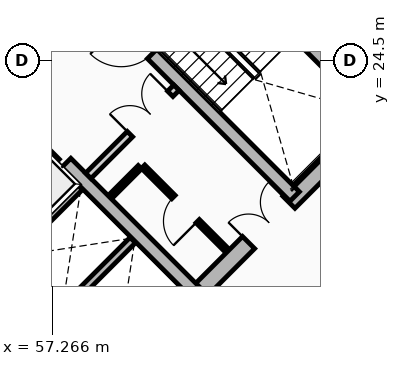
"""IFC4 building model, lengths in metres.
Left out: names, types, materials, properties, quantities, classifications, styles, units other than length and angle.
Written with IfcOpenShell. Run it as: python <this file> out.ifc"""

import sys

from ifc_helpers import new_model, si_unit, direction, frame, frame_2d, origin, place, context, subcontext, project, spatial, rectangle, extrude, source, transform, mapped, element, fill, save


model = new_model("IFC4")
c1 = context("Model", 3, precision=1e-05, world=origin(), true_north=direction((0.0, 1.0)))
c2 = subcontext(c1, "Body", "Model", "MODEL_VIEW")
j1 = project(units=[si_unit("LENGTHUNIT", "METRE"), si_unit("PLANEANGLEUNIT", "RADIAN")], contexts=[c1])
p1 = place(None, origin())
s1 = spatial("IfcSite", under=j1, at=p1, CompositionType="ELEMENT")
p2 = place(p1, origin())
s2 = spatial("IfcBuilding", under=s1, at=p2, CompositionType="ELEMENT")
p3 = place(p2, frame((0.0, 0.0, 102.16)))
s3 = spatial("IfcBuildingStorey", under=s2, at=p3, CompositionType="ELEMENT", Elevation=102.16)
for number, where, z_axis, x_axis in (
    (1, (58.737, 15.697, 0.0), (0.0, 0.0, 1.0), (-0.707, 0.707, 0.0)),
    (2, (66.303, 23.263, 0.0), (0.0, 0.0, 1.0), (-0.707, 0.707, 0.0)),
):
    element("IfcWall", number, at=place(p3, frame(where, z_axis=z_axis, x_axis=x_axis)), inside=s3, PredefinedType="SHEAR", context=c2, shape_type="SweptSolid", body=[
        extrude(rectangle(XDim=14.2, YDim=0.45, at=frame_2d((7.1, 0.0))), origin(), (0.0, 0.0, 1.0), 2.91),
    ])
p4 = place(p3, frame((58.578, 15.856, 0.0), z_axis=(0.0, 0.0, 1.0), x_axis=(0.707106781187, 0.707106781187, 0.0)))
e3 = element("IfcWall", 3, at=p4, inside=s3, PredefinedType="SHEAR", context=c2, shape_type="SweptSolid", body=[
    extrude(rectangle(XDim=10.7, YDim=0.45, at=frame_2d((5.35, 0.0))), origin(), (0.0, 0.0, 1.0), 2.91),
])
m1 = source(origin(), c2, "Body", "SweptSolid", [
    extrude(rectangle(XDim=1.5, YDim=2.02, at=frame_2d((0.75, 1.01))), frame((0.0, 0.235, 0.0), z_axis=(0.0, -1.0, 0.0), x_axis=(1.0, 0.0, 0.0)), (0.0, 0.0, 1.0), 0.47),
])
p5 = place(p4, frame((5.45, 0.0, 0.0)))
e4 = element("IfcOpeningElement", 4, at=p5, cuts=e3, PredefinedType="OPENING", context=c2, shape_type="MappedRepresentation", body=[
    mapped(m1, transform((0.0, 0.0, 0.0), x_axis=(1.0, 0.0, 0.0), y_axis=(0.0, 1.0, 0.0), z_axis=(0.0, 0.0, 1.0), scale=1.0)),
])
p6 = place(p3, frame((61.078, 18.355, 0.0), z_axis=(0.0, 0.0, 1.0), x_axis=(-0.707106781187, 0.707106781187, 0.0)))
e5 = element("IfcWall", 5, at=p6, inside=s3, PredefinedType="SHEAR", context=c2, shape_type="SweptSolid", body=[
    extrude(rectangle(XDim=13.75, YDim=0.35, at=frame_2d((6.875, 0.0))), origin(), (0.0, 0.0, 1.0), 2.91),
])
m2 = source(origin(), c2, "Body", "SweptSolid", [
    extrude(rectangle(XDim=1.1, YDim=2.015, at=frame_2d((0.55, 1.007))), frame((0.0, 0.185, 0.0), z_axis=(0.0, -1.0, 0.0), x_axis=(1.0, 0.0, 0.0)), (0.0, 0.0, 1.0), 0.37),
])
p7 = place(p6, frame((4.875, 0.0, 0.0)))
e6 = element("IfcOpeningElement", 6, at=p7, cuts=e5, PredefinedType="OPENING", context=c2, shape_type="MappedRepresentation", body=[
    mapped(m2, transform((0.0, 0.0, 0.0), x_axis=(1.0, 0.0, 0.0), y_axis=(0.0, 1.0, 0.0), z_axis=(0.0, 0.0, 1.0), scale=1.0)),
])
m3 = source(origin(), c2, "Body", "SweptSolid", [
    extrude(rectangle(XDim=1.15, YDim=2.02, at=frame_2d((0.575, 1.01))), frame((0.0, 0.185, 0.0), z_axis=(0.0, -1.0, 0.0), x_axis=(1.0, 0.0, 0.0)), (0.0, 0.0, 1.0), 0.37),
])
p8 = place(p6, frame((7.295, 0.0, 0.0)))
e7 = element("IfcOpeningElement", 7, at=p8, cuts=e5, PredefinedType="OPENING", context=c2, shape_type="MappedRepresentation", body=[
    mapped(m3, transform((0.0, 0.0, 0.0), x_axis=(1.0, 0.0, 0.0), y_axis=(0.0, 1.0, 0.0), z_axis=(0.0, 0.0, 1.0), scale=1.0)),
])
p9 = place(p3, frame((63.645, 20.922, 0.0), z_axis=(0.0, 0.0, 1.0), x_axis=(-0.707106781187, 0.707106781187, 0.0)))
e8 = element("IfcWall", 8, at=p9, inside=s3, PredefinedType="SHEAR", context=c2, shape_type="SweptSolid", body=[
    extrude(rectangle(XDim=13.75, YDim=0.35, at=frame_2d((6.875, 0.0))), origin(), (0.0, 0.0, 1.0), 2.91),
])
p10 = place(p9, frame((10.0, 0.0, 0.0)))
e9 = element("IfcOpeningElement", 9, at=p10, cuts=e8, PredefinedType="OPENING", context=c2, shape_type="MappedRepresentation", body=[
    mapped(m2, transform((0.0, 0.0, 0.0), x_axis=(1.0, 0.0, 0.0), y_axis=(0.0, 1.0, 0.0), z_axis=(0.0, 0.0, 1.0), scale=1.0)),
])
p11 = place(p9, frame((12.0, 0.0, 0.0)))
e10 = element("IfcOpeningElement", 10, at=p11, cuts=e8, PredefinedType="OPENING", context=c2, shape_type="MappedRepresentation", body=[
    mapped(m2, transform((0.0, 0.0, 0.0), x_axis=(1.0, 0.0, 0.0), y_axis=(0.0, 1.0, 0.0), z_axis=(0.0, 0.0, 1.0), scale=1.0)),
])
p12 = place(p9, frame((5.305, 0.0, 0.0)))
e11 = element("IfcOpeningElement", 11, at=p12, cuts=e8, PredefinedType="OPENING", context=c2, shape_type="MappedRepresentation", body=[
    mapped(m3, transform((0.0, 0.0, 0.0), x_axis=(1.0, 0.0, 0.0), y_axis=(0.0, 1.0, 0.0), z_axis=(0.0, 0.0, 1.0), scale=1.0)),
])
p13 = place(p3, frame((65.83, 23.107, 0.0), z_axis=(0.0, 0.0, 1.0), x_axis=(-0.707088616009, 0.707124945897, 0.0)))
e12 = element("IfcWall", 12, at=p13, inside=s3, PredefinedType="SHEAR", context=c2, shape_type="SweptSolid", body=[
    extrude(rectangle(XDim=6.72, YDim=0.35, at=frame_2d((3.36, 0.0))), origin(), (0.0, 0.0, 1.0), 2.91),
])
p14 = place(p3, frame((55.888, 19.069, 0.0), z_axis=(0.0, 0.0, 1.0), x_axis=(0.707106781187, 0.707106781187, 0.0)))
e13 = element("IfcWall", 13, at=p14, inside=s3, PredefinedType="SHEAR", context=c2, shape_type="SweptSolid", body=[
    extrude(rectangle(XDim=2.97, YDim=0.2, at=frame_2d((1.485, 0.0))), origin(), (0.0, 0.0, 1.0), 2.91),
])
p15 = place(p3, frame((57.284, 17.673, 0.0), z_axis=(0.0, 0.0, 1.0), x_axis=(0.707147878904, 0.70706568108, 0.0)))
e14 = element("IfcWall", 14, at=p15, inside=s3, PredefinedType="SHEAR", context=c2, shape_type="SweptSolid", body=[
    extrude(rectangle(XDim=2.97, YDim=0.2, at=frame_2d((1.485, 0.0))), origin(), (0.0, 0.0, 1.0), 2.91),
])
p16 = place(p3, frame((57.412, 17.97, 0.0), z_axis=(0.0, 0.0, 1.0), x_axis=(-0.707106781187, 0.707106781187, 0.0)))
e15 = element("IfcWall", 15, at=p16, inside=s3, PredefinedType="SHEAR", context=c2, shape_type="SweptSolid", body=[
    extrude(rectangle(XDim=1.735, YDim=0.2, at=frame_2d((0.867, 0.0))), origin(), (0.0, 0.0, 1.0), 2.91),
])
p17 = place(p3, frame((58.214, 21.467, 0.0), z_axis=(0.0, 0.0, 1.0), x_axis=(0.707106781187, 0.707106781187, 0.0)))
e16 = element("IfcWall", 16, at=p17, inside=s3, PredefinedType="PARTITIONING", context=c2, shape_type="SweptSolid", body=[
    extrude(rectangle(XDim=3.28, YDim=0.2, at=frame_2d((1.64, 0.0))), origin(), (0.0, 0.0, 1.0), 2.655),
])
m4 = source(origin(), c2, "Body", "SweptSolid", [
    extrude(rectangle(XDim=1.5, YDim=2.02, at=frame_2d((0.75, 1.01))), frame((0.0, 0.11, 0.0), z_axis=(0.0, -1.0, 0.0), x_axis=(1.0, 0.0, 0.0)), (0.0, 0.0, 1.0), 0.22),
])
p18 = place(p17, frame((1.55, 0.0, 0.0)))
e17 = element("IfcOpeningElement", 17, at=p18, cuts=e16, PredefinedType="OPENING", context=c2, shape_type="MappedRepresentation", body=[
    mapped(m4, transform((0.0, 0.0, 0.0), x_axis=(1.0, 0.0, 0.0), y_axis=(0.0, 1.0, 0.0), z_axis=(0.0, 0.0, 1.0), scale=1.0)),
])
p19 = place(p3, frame((54.961, 24.719, 0.0), z_axis=(0.0, 0.0, 1.0), x_axis=(0.707106781187, 0.707106781187, 0.0)))
e18 = element("IfcWall", 18, at=p19, inside=s3, PredefinedType="PARTITIONING", context=c2, shape_type="SweptSolid", body=[
    extrude(rectangle(XDim=3.28, YDim=0.2, at=frame_2d((1.64, 0.0))), origin(), (0.0, 0.0, 1.0), 2.655),
])
m5 = source(origin(), c2, "Body", "SweptSolid", [
    extrude(rectangle(XDim=0.9, YDim=2.005, at=frame_2d((0.45, 1.002))), frame((0.0, 0.11, 0.0), z_axis=(0.0, -1.0, 0.0), x_axis=(1.0, 0.0, 0.0)), (0.0, 0.0, 1.0), 0.22),
])
p20 = place(p19, frame((0.16, 0.0, 0.0)))
e19 = element("IfcOpeningElement", 19, at=p20, cuts=e18, PredefinedType="OPENING", context=c2, shape_type="MappedRepresentation", body=[
    mapped(m5, transform((0.0, 0.0, 0.0), x_axis=(1.0, 0.0, 0.0), y_axis=(0.0, 1.0, 0.0), z_axis=(0.0, 0.0, 1.0), scale=1.0)),
])
p21 = place(p3, frame((61.835, 19.529, 0.0), z_axis=(0.0, 0.0, 1.0), x_axis=(-0.707146413884, 0.707067146267, 0.0)))
e20 = element("IfcWall", 20, at=p21, inside=s3, PredefinedType="PARTITIONING", context=c2, shape_type="SweptSolid", body=[
    extrude(rectangle(XDim=3.08, YDim=0.125, at=frame_2d((1.54, 0.0))), origin(), (0.0, 0.0, 1.0), 2.655),
])
m6 = source(origin(), c2, "Body", "SweptSolid", [
    extrude(rectangle(XDim=0.9, YDim=2.005, at=frame_2d((0.45, 1.002))), frame((0.0, 0.073, 0.0), z_axis=(0.0, -1.0, 0.0), x_axis=(1.0, 0.0, 0.0)), (0.0, 0.0, 1.0), 0.145),
])
p22 = place(p21, frame((1.05, 0.0, 0.0)))
e21 = element("IfcOpeningElement", 21, at=p22, cuts=e20, PredefinedType="OPENING", context=c2, shape_type="MappedRepresentation", body=[
    mapped(m6, transform((0.0, 0.0, 0.0), x_axis=(1.0, 0.0, 0.0), y_axis=(0.0, 1.0, 0.0), z_axis=(0.0, 0.0, 1.0), scale=1.0)),
])
p23 = place(p3, frame((58.794, 20.915, 0.0), z_axis=(0.0, 0.0, 1.0), x_axis=(0.707106781187, 0.707106781187, 0.0)))
e22 = element("IfcWall", 22, at=p23, inside=s3, PredefinedType="PARTITIONING", context=c2, shape_type="SweptSolid", body=[
    extrude(rectangle(XDim=1.1, YDim=0.125, at=frame_2d((0.55, 0.0))), origin(), (0.0, 0.0, 1.0), 2.655),
])
p24 = place(p3, frame((62.875, 16.709, 0.0), z_axis=(0.0, 0.0, 1.0), x_axis=(0.682290572861, 0.731081099595, 0.0)))
e23 = element("IfcWall", 23, at=p24, inside=s3, PredefinedType="MOVABLE", context=c2, shape_type="SweptSolid", body=[
    extrude(rectangle(XDim=6.6, YDim=0.1, at=frame_2d((3.3, 0.0))), origin(), (0.0, 0.0, 1.0), 2.225),
])
m7 = source(origin(), c2, "Body", "SweptSolid", [
    extrude(rectangle(XDim=1.1, YDim=2.015, at=frame_2d((0.55, 1.007))), frame((0.0, 0.025, 0.0), z_axis=(0.0, -1.0, 0.0), x_axis=(1.0, 0.0, 0.0)), (0.0, 0.0, 1.0), 0.05),
])
p25 = place(p7, origin())
e24 = element("IfcDoor", 24, at=p25, inside=s3, OperationType="SLIDING_TO_RIGHT", PredefinedType="DOOR", context=c2, shape_type="MappedRepresentation", body=[
    mapped(m7, transform((0.0, 0.0, 0.0), x_axis=(1.0, 0.0, 0.0), y_axis=(0.0, 1.0, 0.0), z_axis=(0.0, 0.0, 1.0), scale=1.0)),
])
fill(e6, e24)
m8 = source(origin(), c2, "Body", "SweptSolid", [
    extrude(rectangle(XDim=1.15, YDim=2.02, at=frame_2d((0.575, 1.01))), frame((0.0, 0.025, 0.0), z_axis=(0.0, -1.0, 0.0), x_axis=(1.0, 0.0, 0.0)), (0.0, 0.0, 1.0), 0.05),
])
p26 = place(p12, origin())
e25 = element("IfcDoor", 25, at=p26, inside=s3, OperationType="SINGLE_SWING_RIGHT", PredefinedType="DOOR", context=c2, shape_type="MappedRepresentation", body=[
    mapped(m8, transform((0.0, 0.0, 0.0), x_axis=(1.0, 0.0, 0.0), y_axis=(0.0, 1.0, 0.0), z_axis=(0.0, 0.0, 1.0), scale=1.0)),
])
fill(e11, e25)
m9 = source(origin(), c2, "Body", "SweptSolid", [
    extrude(rectangle(XDim=1.5, YDim=2.02, at=frame_2d((0.75, 1.01))), frame((0.0, 0.025, 0.0), z_axis=(0.0, -1.0, 0.0), x_axis=(1.0, 0.0, 0.0)), (0.0, 0.0, 1.0), 0.05),
])
p27 = place(p5, origin())
e26 = element("IfcDoor", 26, at=p27, inside=s3, OperationType="DOUBLE_DOOR_SINGLE_SWING", PredefinedType="DOOR", context=c2, shape_type="MappedRepresentation", body=[
    mapped(m9, transform((0.0, 0.0, 0.0), x_axis=(1.0, 0.0, 0.0), y_axis=(0.0, 1.0, 0.0), z_axis=(0.0, 0.0, 1.0), scale=1.0)),
])
fill(e4, e26)
p28 = place(p18, origin())
e27 = element("IfcDoor", 27, at=p28, inside=s3, OperationType="DOUBLE_DOOR_SINGLE_SWING", PredefinedType="DOOR", context=c2, shape_type="MappedRepresentation", body=[
    mapped(m9, transform((0.0, 0.0, 0.0), x_axis=(1.0, 0.0, 0.0), y_axis=(0.0, 1.0, 0.0), z_axis=(0.0, 0.0, 1.0), scale=1.0)),
])
fill(e17, e27)
m10 = source(origin(), c2, "Body", "SweptSolid", [
    extrude(rectangle(XDim=0.9, YDim=2.005, at=frame_2d((0.45, 1.002))), frame((0.0, 0.025, 0.0), z_axis=(0.0, -1.0, 0.0), x_axis=(1.0, 0.0, 0.0)), (0.0, 0.0, 1.0), 0.05),
])
p29 = place(p22, origin())
e28 = element("IfcDoor", 28, at=p29, inside=s3, OperationType="SINGLE_SWING_LEFT", PredefinedType="DOOR", context=c2, shape_type="MappedRepresentation", body=[
    mapped(m10, transform((0.0, 0.0, 0.0), x_axis=(1.0, 0.0, 0.0), y_axis=(0.0, 1.0, 0.0), z_axis=(0.0, 0.0, 1.0), scale=1.0)),
])
fill(e21, e28)
save(model, sys.argv[1])
